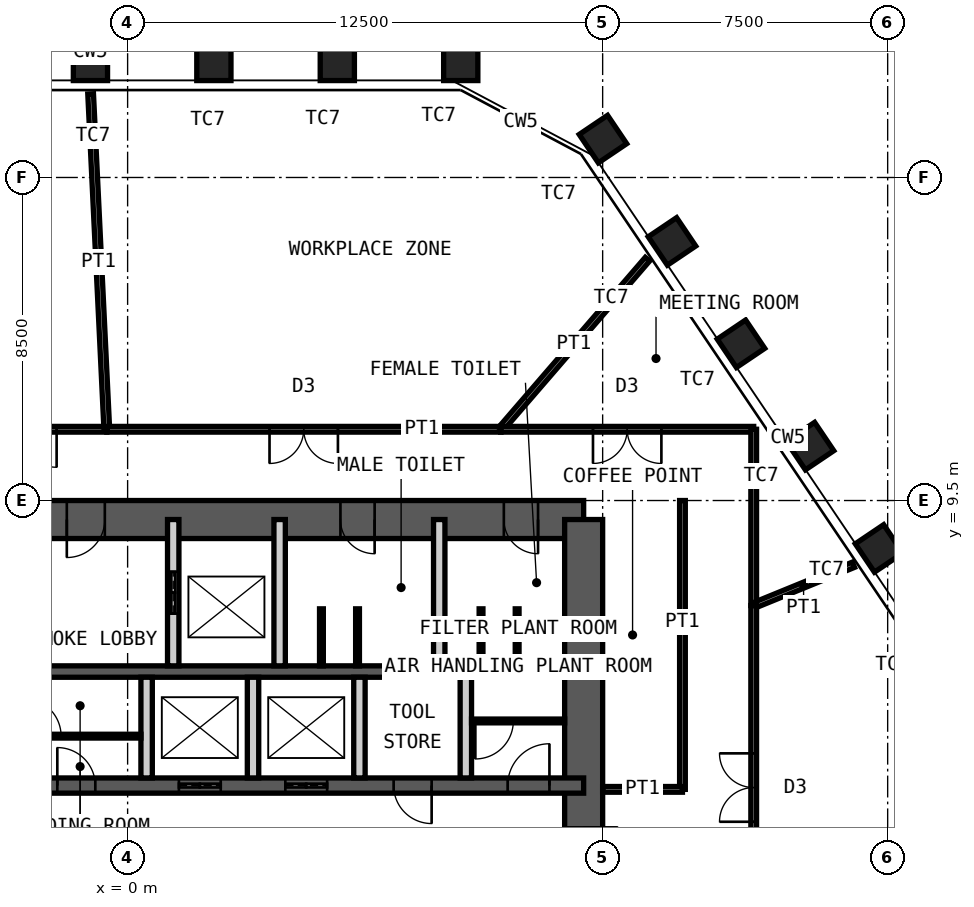
"""IFC4 building model, lengths in metres.
Left out: names, types, materials, properties, quantities, classifications, styles, units other than length and angle.
Written with IfcOpenShell. Run it as: python <this file> out.ifc"""

import sys

from ifc_helpers import new_model, si_unit, direction, frame, frame_2d, origin, origin_2d, place, context, subcontext, project, spatial, rectangle, hollow_rectangle, extrude, element, fill, save


model = new_model("IFC4")
c1 = context("Model", 3, precision=1e-05, world=origin(), true_north=direction((0.0, 1.0)))
c2 = subcontext(c1, "Body", "Model", "MODEL_VIEW")
j1 = project(units=[si_unit("LENGTHUNIT", "METRE"), si_unit("PLANEANGLEUNIT", "RADIAN")], contexts=[c1])
p1 = place(None, origin())
s1 = spatial("IfcSite", under=j1, at=p1, CompositionType="ELEMENT")
p2 = place(p1, origin())
s2 = spatial("IfcBuilding", under=s1, at=p2, CompositionType="ELEMENT")
p3 = place(p2, frame((0.0, 0.0, 270.4)))
s3 = spatial("IfcBuildingStorey", under=s2, at=p3, CompositionType="ELEMENT", Elevation=270.4)
for number, where, z_axis, x_axis in (
    (1, (-0.978, 21.0, 0.0), (0.0, 0.0, 1.0), (-1.0, 0.0, 0.0)),
    (2, (2.27, 21.0, 0.0), (0.0, 0.0, 1.0), (-1.0, 0.0, 0.0)),
    (3, (5.518, 21.0, 0.0), (0.0, 0.0, 1.0), (-1.0, 0.0, 0.0)),
    (4, (8.766, 21.0, 0.0), (0.0, 0.0, 1.0), (-1.0, 0.0, 0.0)),
    (5, (12.508, 19.01, 0.0), (0.0, 0.0, 1.0), (-0.559, 0.829, 0.0)),
    (6, (14.324, 16.318, 0.0), (0.0, 0.0, 1.0), (-0.559, 0.829, 0.0)),
    (7, (16.141, 13.625, 0.0), (0.0, 0.0, 1.0), (-0.559, 0.829, 0.0)),
    (8, (17.957, 10.932, 0.0), (0.0, 0.0, 1.0), (-0.559, 0.829, 0.0)),
    (9, (19.773, 8.239, 0.0), (0.0, 0.0, 1.0), (-0.559, 0.829, 0.0)),
):
    element("IfcColumn", number, at=place(p3, frame(where, z_axis=z_axis, x_axis=x_axis)), inside=s3, PredefinedType="COLUMN", context=c2, shape_type="SweptSolid", body=[
        extrude(hollow_rectangle(XDim=0.9, YDim=0.9, WallThickness=0.06, at=origin_2d()), origin(), (0.0, 0.0, 1.0), 4.2),
    ])
p4 = place(p3, frame((-12.0, 9.0, 0.0), z_axis=(0.0, 0.0, 1.0), x_axis=(1.0, 0.0, 0.0)))
e10 = element("IfcWall", 10, at=p4, inside=s3, PredefinedType="SHEAR", context=c2, shape_type="SweptSolid", body=[
    extrude(rectangle(XDim=24.0, YDim=1.0, at=frame_2d((12.0, 0.0))), origin(), (0.0, 0.0, 1.0), 4.2),
])
p5 = place(p4, frame((10.4, 0.0, 0.0)))
e11 = element("IfcOpeningElement", 11, at=p5, cuts=e10, PredefinedType="OPENING", context=c2, shape_type="SweptSolid", body=[
    extrude(rectangle(XDim=1.0, YDim=2.1, at=frame_2d((0.5, 1.05))), frame((0.0, 0.51, 0.0), z_axis=(0.0, -1.0, 0.0), x_axis=(1.0, 0.0, 0.0)), (0.0, 0.0, 1.0), 1.02),
])
p6 = place(p4, frame((17.6, 0.0, 0.0)))
e12 = element("IfcOpeningElement", 12, at=p6, cuts=e10, PredefinedType="OPENING", context=c2, shape_type="SweptSolid", body=[
    extrude(rectangle(XDim=0.9, YDim=2.1, at=frame_2d((0.45, 1.05))), frame((0.0, 0.51, 0.0), z_axis=(0.0, -1.0, 0.0), x_axis=(1.0, 0.0, 0.0)), (0.0, 0.0, 1.0), 1.02),
])
p7 = place(p4, frame((21.9, 0.0, 0.0)))
e13 = element("IfcOpeningElement", 13, at=p7, cuts=e10, PredefinedType="OPENING", context=c2, shape_type="SweptSolid", body=[
    extrude(rectangle(XDim=0.9, YDim=2.1, at=frame_2d((0.45, 1.05))), frame((0.0, 0.51, 0.0), z_axis=(0.0, -1.0, 0.0), x_axis=(1.0, 0.0, 0.0)), (0.0, 0.0, 1.0), 1.02),
])
p8 = place(p3, frame((12.0, -9.0, 0.0), z_axis=(0.0, 0.0, 1.0), x_axis=(0.0, 1.0, 0.0)))
e14 = element("IfcWall", 14, at=p8, inside=s3, PredefinedType="SHEAR", context=c2, shape_type="SweptSolid", body=[
    extrude(rectangle(XDim=18.0, YDim=1.0, at=frame_2d((9.0, 0.0))), origin(), (0.0, 0.0, 1.0), 4.2),
])
p9 = place(p8, frame((8.1, 0.0, 0.0)))
e15 = element("IfcOpeningElement", 15, at=p9, cuts=e14, PredefinedType="OPENING", context=c2, shape_type="SweptSolid", body=[
    extrude(rectangle(XDim=1.8, YDim=2.1, at=frame_2d((0.9, 1.05))), frame((0.0, 0.51, 0.0), z_axis=(0.0, -1.0, 0.0), x_axis=(1.0, 0.0, 0.0)), (0.0, 0.0, 1.0), 1.02),
])
p10 = place(p3, frame((-12.0, 5.0, 0.0), z_axis=(0.0, 0.0, 1.0), x_axis=(1.0, 0.0, 0.0)))
e16 = element("IfcWall", 16, at=p10, inside=s3, PredefinedType="SHEAR", context=c2, shape_type="SweptSolid", body=[
    extrude(rectangle(XDim=24.0, YDim=0.3, at=frame_2d((12.0, 0.0))), origin(), (0.0, 0.0, 1.0), 4.2),
])
p11 = place(p3, frame((-12.0, 2.0, 0.0), z_axis=(0.0, 0.0, 1.0), x_axis=(1.0, 0.0, 0.0)))
e17 = element("IfcWall", 17, at=p11, inside=s3, PredefinedType="SHEAR", context=c2, shape_type="SweptSolid", body=[
    extrude(rectangle(XDim=24.0, YDim=0.4, at=frame_2d((12.0, 0.0))), origin(), (0.0, 0.0, 1.0), 4.2),
])
p12 = place(p11, frame((2.4, 0.0, 0.0)))
e18 = element("IfcOpeningElement", 18, at=p12, cuts=e17, PredefinedType="OPENING", context=c2, shape_type="SweptSolid", body=[
    extrude(rectangle(XDim=1.1, YDim=2.1, at=frame_2d((0.55, 1.05))), frame((0.0, 0.21, 0.0), z_axis=(0.0, -1.0, 0.0), x_axis=(1.0, 0.0, 0.0)), (0.0, 0.0, 1.0), 0.42),
])
p13 = place(p11, frame((22.0, 0.0, 0.0)))
e19 = element("IfcOpeningElement", 19, at=p13, cuts=e17, PredefinedType="OPENING", context=c2, shape_type="SweptSolid", body=[
    extrude(rectangle(XDim=1.1, YDim=2.1, at=frame_2d((0.55, 1.05))), frame((0.0, 0.21, 0.0), z_axis=(0.0, -1.0, 0.0), x_axis=(1.0, 0.0, 0.0)), (0.0, 0.0, 1.0), 0.42),
])
p14 = place(p11, frame((10.15, 0.0, 0.0)))
e20 = element("IfcOpeningElement", 20, at=p14, cuts=e17, PredefinedType="OPENING", context=c2, shape_type="SweptSolid", body=[
    extrude(rectangle(XDim=1.0, YDim=2.1, at=frame_2d((0.5, 1.05))), frame((0.0, 0.21, 0.0), z_axis=(0.0, -1.0, 0.0), x_axis=(1.0, 0.0, 0.0)), (0.0, 0.0, 1.0), 0.42),
])
p15 = place(p11, frame((6.9, 0.0, 0.0)))
e21 = element("IfcOpeningElement", 21, at=p15, cuts=e17, PredefinedType="OPENING", context=c2, shape_type="SweptSolid", body=[
    extrude(rectangle(XDim=1.0, YDim=2.1, at=frame_2d((0.5, 1.05))), frame((0.0, 0.21, 0.0), z_axis=(0.0, -1.0, 0.0), x_axis=(1.0, 0.0, 0.0)), (0.0, 0.0, 1.0), 0.42),
])
p16 = place(p11, frame((13.35, 0.0, 0.0)))
e22 = element("IfcOpeningElement", 22, at=p16, cuts=e17, PredefinedType="OPENING", context=c2, shape_type="SweptSolid", body=[
    extrude(rectangle(XDim=1.1, YDim=2.4, at=frame_2d((0.55, 1.2))), frame((0.0, 0.21, 0.0), z_axis=(0.0, -1.0, 0.0), x_axis=(1.0, 0.0, 0.0)), (0.0, 0.0, 1.0), 0.42),
])
p17 = place(p11, frame((16.15, 0.0, 0.0)))
e23 = element("IfcOpeningElement", 23, at=p17, cuts=e17, PredefinedType="OPENING", context=c2, shape_type="SweptSolid", body=[
    extrude(rectangle(XDim=1.1, YDim=2.4, at=frame_2d((0.55, 1.2))), frame((0.0, 0.21, 0.0), z_axis=(0.0, -1.0, 0.0), x_axis=(1.0, 0.0, 0.0)), (0.0, 0.0, 1.0), 0.42),
])
p18 = place(p11, frame((19.0, 0.0, 0.0)))
e24 = element("IfcOpeningElement", 24, at=p18, cuts=e17, PredefinedType="OPENING", context=c2, shape_type="SweptSolid", body=[
    extrude(rectangle(XDim=1.0, YDim=2.1, at=frame_2d((0.5, 1.05))), frame((0.0, 0.21, 0.0), z_axis=(0.0, -1.0, 0.0), x_axis=(1.0, 0.0, 0.0)), (0.0, 0.0, 1.0), 0.42),
])
p19 = place(p3, frame((1.2, 5.15, 0.0), z_axis=(0.0, 0.0, 1.0), x_axis=(0.0, 1.0, 0.0)))
e25 = element("IfcWall", 25, at=p19, inside=s3, PredefinedType="PARTITIONING", context=c2, shape_type="SweptSolid", body=[
    extrude(rectangle(XDim=3.85, YDim=0.3, at=frame_2d((1.925, 0.0))), origin(), (0.0, 0.0, 1.0), 3.98),
])
p20 = place(p19, frame((1.375, 0.0, 0.0)))
e26 = element("IfcOpeningElement", 26, at=p20, cuts=e25, PredefinedType="OPENING", context=c2, shape_type="SweptSolid", body=[
    extrude(rectangle(XDim=1.1, YDim=2.4, at=frame_2d((0.55, 1.2))), frame((0.0, 0.16, 0.0), z_axis=(0.0, -1.0, 0.0), x_axis=(1.0, 0.0, 0.0)), (0.0, 0.0, 1.0), 0.32),
])
for number, where, z_axis, x_axis in (
    (27, (4.0, 5.15, 0.0), (0.0, 0.0, 1.0), (0.0, 1.0, 0.0)),
    (28, (8.2, 5.15, 0.0), (0.0, 0.0, 1.0), (0.0, 1.0, 0.0)),
):
    element("IfcWall", number, at=place(p3, frame(where, z_axis=z_axis, x_axis=x_axis)), inside=s3, PredefinedType="PARTITIONING", context=c2, shape_type="SweptSolid", body=[
        extrude(rectangle(XDim=3.85, YDim=0.3, at=frame_2d((1.925, 0.0))), origin(), (0.0, 0.0, 1.0), 3.98),
    ])
for number, where, z_axis, x_axis in (
    (29, (0.5, 2.2, 0.0), (0.0, 0.0, 1.0), (0.0, 1.0, 0.0)),
    (30, (3.3, 2.2, 0.0), (0.0, 0.0, 1.0), (0.0, 1.0, 0.0)),
    (31, (6.1, 2.2, 0.0), (0.0, 0.0, 1.0), (0.0, 1.0, 0.0)),
    (32, (8.9, 2.2, 0.0), (0.0, 0.0, 1.0), (0.0, 1.0, 0.0)),
):
    element("IfcWall", number, at=place(p3, frame(where, z_axis=z_axis, x_axis=x_axis)), inside=s3, PredefinedType="PARTITIONING", context=c2, shape_type="SweptSolid", body=[
        extrude(rectangle(XDim=2.65, YDim=0.3, at=frame_2d((1.325, 0.0))), origin(), (0.0, 0.0, 1.0), 3.98),
    ])
p21 = place(p3, frame((-2.85, 3.3, 0.0), z_axis=(0.0, 0.0, 1.0), x_axis=(1.0, 0.0, 0.0)))
e33 = element("IfcWall", 33, at=p21, inside=s3, PredefinedType="PARTITIONING", context=c2, shape_type="SweptSolid", body=[
    extrude(rectangle(XDim=3.2, YDim=0.1, at=frame_2d((1.6, 0.0))), origin(), (0.0, 0.0, 1.0), 3.98),
])
p22 = place(p21, frame((0.1, 0.0, 0.0)))
e34 = element("IfcOpeningElement", 34, at=p22, cuts=e33, PredefinedType="OPENING", context=c2, shape_type="SweptSolid", body=[
    extrude(rectangle(XDim=1.0, YDim=2.4, at=frame_2d((0.5, 1.2))), frame((0.0, 0.06, 0.0), z_axis=(0.0, -1.0, 0.0), x_axis=(1.0, 0.0, 0.0)), (0.0, 0.0, 1.0), 0.12),
])
p23 = place(p3, frame((9.05, 3.7, 0.0), z_axis=(0.0, 0.0, 1.0), x_axis=(1.0, 0.0, 0.0)))
e35 = element("IfcWall", 35, at=p23, inside=s3, PredefinedType="PARTITIONING", context=c2, shape_type="SweptSolid", body=[
    extrude(rectangle(XDim=2.45, YDim=0.1, at=frame_2d((1.225, 0.0))), origin(), (0.0, 0.0, 1.0), 3.98),
])
p24 = place(p23, frame((0.1, 0.0, 0.0)))
e36 = element("IfcOpeningElement", 36, at=p24, cuts=e35, PredefinedType="OPENING", context=c2, shape_type="SweptSolid", body=[
    extrude(rectangle(XDim=1.0, YDim=2.4, at=frame_2d((0.5, 1.2))), frame((0.0, 0.06, 0.0), z_axis=(0.0, -1.0, 0.0), x_axis=(1.0, 0.0, 0.0)), (0.0, 0.0, 1.0), 0.12),
])
for number, where, z_axis, x_axis in (
    (37, (5.1, 5.15, 0.0), (0.0, 0.0, 1.0), (0.0, 1.0, 0.0)),
    (38, (6.05, 5.15, 0.0), (0.0, 0.0, 1.0), (0.0, 1.0, 0.0)),
    (39, (9.3, 5.15, 0.0), (0.0, 0.0, 1.0), (0.0, 1.0, 0.0)),
    (40, (10.25, 5.15, 0.0), (0.0, 0.0, 1.0), (0.0, 1.0, 0.0)),
):
    element("IfcWall", number, at=place(p3, frame(where, z_axis=z_axis, x_axis=x_axis)), inside=s3, PredefinedType="PARTITIONING", context=c2, shape_type="SweptSolid", body=[
        extrude(rectangle(XDim=1.5, YDim=0.1, at=frame_2d((0.75, 0.0))), origin(), (0.0, 0.0, 1.0), 2.1),
    ])
p25 = place(p3, frame((-4.188, 11.375, 0.0), z_axis=(0.0, 0.0, 1.0), x_axis=(1.0, 0.0, 0.0)))
e41 = element("IfcWall", 41, at=p25, inside=s3, PredefinedType="PARTITIONING", context=c2, shape_type="SweptSolid", body=[
    extrude(rectangle(XDim=3.64, YDim=0.15, at=frame_2d((1.82, 0.0))), origin(), (0.0, 0.0, 1.0), 4.03),
])
p26 = place(p25, frame((1.32, 0.0, 0.0)))
e42 = element("IfcOpeningElement", 42, at=p26, cuts=e41, PredefinedType="OPENING", context=c2, shape_type="SweptSolid", body=[
    extrude(rectangle(XDim=1.0, YDim=2.4, at=frame_2d((0.5, 1.2))), frame((0.0, 0.085, 0.0), z_axis=(0.0, -1.0, 0.0), x_axis=(1.0, 0.0, 0.0)), (0.0, 0.0, 1.0), 0.17),
])
p27 = place(p3, frame((-0.973, 20.2, 0.0), z_axis=(0.0, 0.0, 1.0), x_axis=(0.048134910622, -0.998840843368, 0.0)))
e43 = element("IfcWall", 43, at=p27, inside=s3, PredefinedType="PARTITIONING", context=c2, shape_type="SweptSolid", body=[
    extrude(rectangle(XDim=8.835, YDim=0.15, at=frame_2d((4.418, 0.0))), origin(), (0.0, 0.0, 1.0), 3.33),
])
p28 = place(p3, frame((-0.548, 11.375, 0.0), z_axis=(0.0, 0.0, 1.0), x_axis=(1.0, 0.0, 0.0)))
e44 = element("IfcWall", 44, at=p28, inside=s3, PredefinedType="PARTITIONING", context=c2, shape_type="SweptSolid", body=[
    extrude(rectangle(XDim=10.365, YDim=0.15, at=frame_2d((5.182, 0.0))), origin(), (0.0, 0.0, 1.0), 4.03),
])
p29 = place(p28, frame((4.282, 0.0, 0.0)))
e45 = element("IfcOpeningElement", 45, at=p29, cuts=e44, PredefinedType="OPENING", context=c2, shape_type="SweptSolid", body=[
    extrude(rectangle(XDim=1.8, YDim=2.4, at=frame_2d((0.9, 1.2))), frame((0.0, 0.085, 0.0), z_axis=(0.0, -1.0, 0.0), x_axis=(1.0, 0.0, 0.0)), (0.0, 0.0, 1.0), 0.17),
])
p30 = place(p3, frame((13.678, 15.85, 0.0), z_axis=(0.0, 0.0, 1.0), x_axis=(-0.653328423077, -0.757074614288, 0.0)))
e46 = element("IfcWall", 46, at=p30, inside=s3, PredefinedType="PARTITIONING", context=c2, shape_type="SweptSolid", body=[
    extrude(rectangle(XDim=5.911, YDim=0.15, at=frame_2d((2.956, 0.0))), origin(), (0.0, 0.0, 1.0), 3.33),
])
p31 = place(p3, frame((9.816, 11.375, 0.0), z_axis=(0.0, 0.0, 1.0), x_axis=(1.0, 0.0, 0.0)))
e47 = element("IfcWall", 47, at=p31, inside=s3, PredefinedType="PARTITIONING", context=c2, shape_type="SweptSolid", body=[
    extrude(rectangle(XDim=6.659, YDim=0.15, at=frame_2d((3.329, 0.0))), origin(), (0.0, 0.0, 1.0), 4.03),
])
p32 = place(p31, frame((2.429, 0.0, 0.0)))
e48 = element("IfcOpeningElement", 48, at=p32, cuts=e47, PredefinedType="OPENING", context=c2, shape_type="SweptSolid", body=[
    extrude(rectangle(XDim=1.8, YDim=2.4, at=frame_2d((0.9, 1.2))), frame((0.0, 0.085, 0.0), z_axis=(0.0, -1.0, 0.0), x_axis=(1.0, 0.0, 0.0)), (0.0, 0.0, 1.0), 0.17),
])
p33 = place(p3, frame((16.475, 11.375, 0.0), z_axis=(0.0, 0.0, 1.0), x_axis=(0.0, -1.0, 0.0)))
e49 = element("IfcWall", 49, at=p33, inside=s3, PredefinedType="PARTITIONING", context=c2, shape_type="SweptSolid", body=[
    extrude(rectangle(XDim=4.638, YDim=0.15, at=frame_2d((2.319, 0.0))), origin(), (0.0, 0.0, 1.0), 4.03),
])
p34 = place(p3, frame((19.1, 7.81, 0.0), z_axis=(0.0, 0.0, 1.0), x_axis=(-0.925593572601, -0.378518874509, 0.0)))
e50 = element("IfcWall", 50, at=p34, inside=s3, PredefinedType="PARTITIONING", context=c2, shape_type="SweptSolid", body=[
    extrude(rectangle(XDim=2.836, YDim=0.15, at=frame_2d((1.418, 0.0))), origin(), (0.0, 0.0, 1.0), 3.33),
])
p35 = place(p3, frame((16.475, 6.737, 0.0), z_axis=(0.0, 0.0, 1.0), x_axis=(0.0, -1.0, 0.0)))
e51 = element("IfcWall", 51, at=p35, inside=s3, PredefinedType="PARTITIONING", context=c2, shape_type="SweptSolid", body=[
    extrude(rectangle(XDim=9.578, YDim=0.15, at=frame_2d((4.789, 0.0))), origin(), (0.0, 0.0, 1.0), 4.03),
])
p36 = place(p35, frame((3.889, 0.0, 0.0)))
e52 = element("IfcOpeningElement", 52, at=p36, cuts=e51, PredefinedType="OPENING", context=c2, shape_type="SweptSolid", body=[
    extrude(rectangle(XDim=1.8, YDim=2.4, at=frame_2d((0.9, 1.2))), frame((0.0, 0.085, 0.0), z_axis=(0.0, -1.0, 0.0), x_axis=(1.0, 0.0, 0.0)), (0.0, 0.0, 1.0), 0.17),
])
p37 = place(p3, frame((14.6, 1.9, 0.0), z_axis=(0.0, 0.0, 1.0), x_axis=(0.0, 1.0, 0.0)))
e53 = element("IfcWall", 53, at=p37, inside=s3, PredefinedType="PARTITIONING", context=c2, shape_type="SweptSolid", body=[
    extrude(rectangle(XDim=7.6, YDim=0.15, at=frame_2d((3.8, 0.0))), origin(), (0.0, 0.0, 1.0), 4.03),
])
p38 = place(p3, frame((12.5, 1.9, 0.0), z_axis=(0.0, 0.0, 1.0), x_axis=(1.0, 0.0, 0.0)))
e54 = element("IfcWall", 54, at=p38, inside=s3, PredefinedType="PARTITIONING", context=c2, shape_type="SweptSolid", body=[
    extrude(rectangle(XDim=2.1, YDim=0.15, at=frame_2d((1.05, 0.0))), origin(), (0.0, 0.0, 1.0), 2.93),
])
p39 = place(p5, origin())
e55 = element("IfcDoor", 55, at=p39, inside=s3, OperationType="SINGLE_SWING_LEFT", PredefinedType="DOOR", context=c2, shape_type="SweptSolid", body=[
    extrude(rectangle(XDim=1.0, YDim=2.1, at=frame_2d((0.5, 1.05))), frame((0.0, 0.025, 0.0), z_axis=(0.0, -1.0, 0.0), x_axis=(1.0, 0.0, 0.0)), (0.0, 0.0, 1.0), 0.05),
])
fill(e11, e55)
p40 = place(p6, origin())
e56 = element("IfcDoor", 56, at=p40, inside=s3, OperationType="SINGLE_SWING_RIGHT", PredefinedType="DOOR", context=c2, shape_type="SweptSolid", body=[
    extrude(rectangle(XDim=0.9, YDim=2.1, at=frame_2d((0.45, 1.05))), frame((0.0, 0.025, 0.0), z_axis=(0.0, -1.0, 0.0), x_axis=(1.0, 0.0, 0.0)), (0.0, 0.0, 1.0), 0.05),
])
fill(e12, e56)
p41 = place(p7, origin())
e57 = element("IfcDoor", 57, at=p41, inside=s3, OperationType="SINGLE_SWING_RIGHT", PredefinedType="DOOR", context=c2, shape_type="SweptSolid", body=[
    extrude(rectangle(XDim=0.9, YDim=2.1, at=frame_2d((0.45, 1.05))), frame((0.0, 0.025, 0.0), z_axis=(0.0, -1.0, 0.0), x_axis=(1.0, 0.0, 0.0)), (0.0, 0.0, 1.0), 0.05),
])
fill(e13, e57)
p42 = place(p13, origin())
e58 = element("IfcDoor", 58, at=p42, inside=s3, OperationType="SINGLE_SWING_LEFT", PredefinedType="DOOR", context=c2, shape_type="SweptSolid", body=[
    extrude(rectangle(XDim=1.1, YDim=2.1, at=frame_2d((0.55, 1.05))), frame((0.0, 0.025, 0.0), z_axis=(0.0, -1.0, 0.0), x_axis=(1.0, 0.0, 0.0)), (0.0, 0.0, 1.0), 0.05),
])
fill(e19, e58)
p43 = place(p14, origin())
e59 = element("IfcDoor", 59, at=p43, inside=s3, OperationType="SINGLE_SWING_RIGHT", PredefinedType="DOOR", context=c2, shape_type="SweptSolid", body=[
    extrude(rectangle(XDim=1.0, YDim=2.1, at=frame_2d((0.5, 1.05))), frame((0.0, 0.025, 0.0), z_axis=(0.0, -1.0, 0.0), x_axis=(1.0, 0.0, 0.0)), (0.0, 0.0, 1.0), 0.05),
])
fill(e20, e59)
p44 = place(p9, origin())
e60 = element("IfcDoor", 60, at=p44, inside=s3, OperationType="DOUBLE_DOOR_DOUBLE_SWING", PredefinedType="DOOR", context=c2, shape_type="SweptSolid", body=[
    extrude(rectangle(XDim=1.8, YDim=2.1, at=frame_2d((0.9, 1.05))), frame((0.0, 0.025, 0.0), z_axis=(0.0, -1.0, 0.0), x_axis=(1.0, 0.0, 0.0)), (0.0, 0.0, 1.0), 0.05),
])
fill(e15, e60)
p45 = place(p20, origin())
e61 = element("IfcDoor", 61, at=p45, inside=s3, OperationType="DOUBLE_DOOR_SLIDING", PredefinedType="DOOR", context=c2, shape_type="SweptSolid", body=[
    extrude(rectangle(XDim=1.1, YDim=2.4, at=frame_2d((0.55, 1.2))), frame((0.0, 0.025, 0.0), z_axis=(0.0, -1.0, 0.0), x_axis=(1.0, 0.0, 0.0)), (0.0, 0.0, 1.0), 0.05),
])
fill(e26, e61)
p46 = place(p16, origin())
e62 = element("IfcDoor", 62, at=p46, inside=s3, OperationType="DOUBLE_DOOR_SLIDING", PredefinedType="DOOR", context=c2, shape_type="SweptSolid", body=[
    extrude(rectangle(XDim=1.1, YDim=2.4, at=frame_2d((0.55, 1.2))), frame((0.0, 0.025, 0.0), z_axis=(0.0, -1.0, 0.0), x_axis=(1.0, 0.0, 0.0)), (0.0, 0.0, 1.0), 0.05),
])
fill(e22, e62)
p47 = place(p17, origin())
e63 = element("IfcDoor", 63, at=p47, inside=s3, OperationType="DOUBLE_DOOR_SLIDING", PredefinedType="DOOR", context=c2, shape_type="SweptSolid", body=[
    extrude(rectangle(XDim=1.1, YDim=2.4, at=frame_2d((0.55, 1.2))), frame((0.0, 0.025, 0.0), z_axis=(0.0, -1.0, 0.0), x_axis=(1.0, 0.0, 0.0)), (0.0, 0.0, 1.0), 0.05),
])
fill(e23, e63)
p48 = place(p18, origin())
e64 = element("IfcDoor", 64, at=p48, inside=s3, OperationType="SINGLE_SWING_RIGHT", PredefinedType="DOOR", context=c2, shape_type="SweptSolid", body=[
    extrude(rectangle(XDim=1.0, YDim=2.1, at=frame_2d((0.5, 1.05))), frame((0.0, 0.025, 0.0), z_axis=(0.0, -1.0, 0.0), x_axis=(1.0, 0.0, 0.0)), (0.0, 0.0, 1.0), 0.05),
])
fill(e24, e64)
p49 = place(p22, origin())
e65 = element("IfcDoor", 65, at=p49, inside=s3, OperationType="SINGLE_SWING_RIGHT", PredefinedType="DOOR", context=c2, shape_type="SweptSolid", body=[
    extrude(rectangle(XDim=1.0, YDim=2.4, at=frame_2d((0.5, 1.2))), frame((0.0, 0.025, 0.0), z_axis=(0.0, -1.0, 0.0), x_axis=(1.0, 0.0, 0.0)), (0.0, 0.0, 1.0), 0.05),
])
fill(e34, e65)
p50 = place(p24, origin())
e66 = element("IfcDoor", 66, at=p50, inside=s3, OperationType="SINGLE_SWING_LEFT", PredefinedType="DOOR", context=c2, shape_type="SweptSolid", body=[
    extrude(rectangle(XDim=1.0, YDim=2.4, at=frame_2d((0.5, 1.2))), frame((0.0, 0.025, 0.0), z_axis=(0.0, -1.0, 0.0), x_axis=(1.0, 0.0, 0.0)), (0.0, 0.0, 1.0), 0.05),
])
fill(e36, e66)
p51 = place(p26, origin())
e67 = element("IfcDoor", 67, at=p51, inside=s3, OperationType="SINGLE_SWING_RIGHT", PredefinedType="DOOR", context=c2, shape_type="SweptSolid", body=[
    extrude(rectangle(XDim=1.0, YDim=2.4, at=frame_2d((0.5, 1.2))), frame((0.0, 0.025, 0.0), z_axis=(0.0, -1.0, 0.0), x_axis=(1.0, 0.0, 0.0)), (0.0, 0.0, 1.0), 0.05),
])
fill(e42, e67)
p52 = place(p29, origin())
e68 = element("IfcDoor", 68, at=p52, inside=s3, OperationType="DOUBLE_DOOR_DOUBLE_SWING", PredefinedType="DOOR", context=c2, shape_type="SweptSolid", body=[
    extrude(rectangle(XDim=1.8, YDim=2.4, at=frame_2d((0.9, 1.2))), frame((0.0, 0.025, 0.0), z_axis=(0.0, -1.0, 0.0), x_axis=(1.0, 0.0, 0.0)), (0.0, 0.0, 1.0), 0.05),
])
fill(e45, e68)
p53 = place(p32, origin())
e69 = element("IfcDoor", 69, at=p53, inside=s3, OperationType="DOUBLE_DOOR_DOUBLE_SWING", PredefinedType="DOOR", context=c2, shape_type="SweptSolid", body=[
    extrude(rectangle(XDim=1.8, YDim=2.4, at=frame_2d((0.9, 1.2))), frame((0.0, 0.025, 0.0), z_axis=(0.0, -1.0, 0.0), x_axis=(1.0, 0.0, 0.0)), (0.0, 0.0, 1.0), 0.05),
])
fill(e48, e69)
p54 = place(p36, origin())
e70 = element("IfcDoor", 70, at=p54, inside=s3, OperationType="DOUBLE_DOOR_DOUBLE_SWING", PredefinedType="DOOR", context=c2, shape_type="SweptSolid", body=[
    extrude(rectangle(XDim=1.8, YDim=2.4, at=frame_2d((0.9, 1.2))), frame((0.0, 0.025, 0.0), z_axis=(0.0, -1.0, 0.0), x_axis=(1.0, 0.0, 0.0)), (0.0, 0.0, 1.0), 0.05),
])
fill(e52, e70)
save(model, sys.argv[1])
